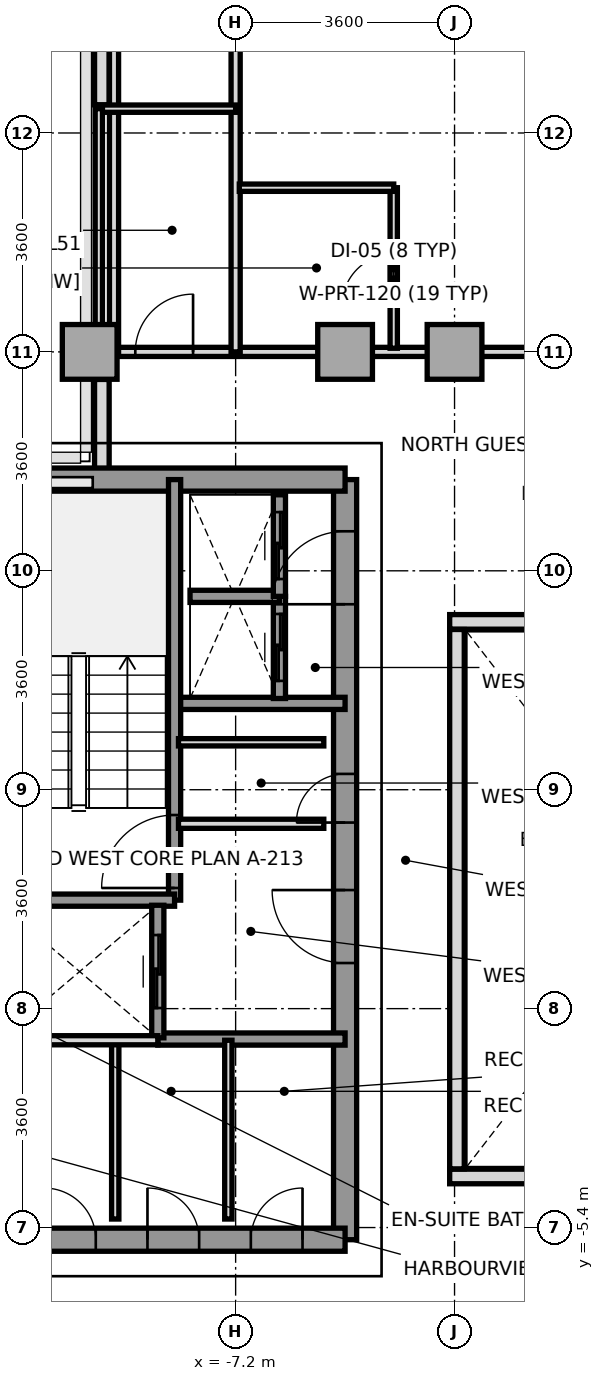
"""IFC4 building model, lengths in metres.
Left out: names, types, materials, properties, quantities, classifications, styles, units other than length and angle.
Written with IfcOpenShell. Run it as: python <this file> out.ifc"""

import sys

from ifc_helpers import new_model, si_unit, direction, frame, frame_2d, origin, origin_2d, place, context, subcontext, project, spatial, rectangle, extrude, source, transform, mapped, element, fill, save


model = new_model("IFC4")
c1 = context("Model", 3, precision=1e-05, world=origin(), true_north=direction((0.0, 1.0)))
c2 = subcontext(c1, "Body", "Model", "MODEL_VIEW")
j1 = project(units=[si_unit("LENGTHUNIT", "METRE"), si_unit("PLANEANGLEUNIT", "RADIAN")], contexts=[c1])
p1 = place(None, origin())
s1 = spatial("IfcSite", under=j1, at=p1, CompositionType="ELEMENT")
p2 = place(p1, origin())
s2 = spatial("IfcBuilding", under=s1, at=p2, CompositionType="ELEMENT")
p3 = place(p2, frame((0.0, 0.0, 187.6)))
s3 = spatial("IfcBuildingStorey", under=s2, at=p3, CompositionType="ELEMENT", Elevation=187.6)
m1 = source(origin(), c2, "Body", "SweptSolid", [
    extrude(rectangle(XDim=0.9, YDim=0.9, at=origin_2d()), origin(), (0.0, 0.0, 1.0), 3.2),
])
for number, where, z_axis, x_axis in (
    (1, (-9.6, 9.0, 0.0), (0.0, 0.0, 1.0), (1.0, 0.0, 0.0)),
    (2, (-5.4, 9.0, 0.0), (0.0, 0.0, 1.0), (1.0, 0.0, 0.0)),
    (3, (-3.6, 9.0, 0.0), (0.0, 0.0, 1.0), (1.0, 0.0, 0.0)),
):
    element("IfcColumn", number, at=place(p3, frame(where, z_axis=z_axis, x_axis=x_axis)), inside=s3, PredefinedType="COLUMN", context=c2, shape_type="MappedRepresentation", body=[
        mapped(m1, transform((0.0, 0.0, 0.0), x_axis=(1.0, 0.0, 0.0), y_axis=(0.0, 1.0, 0.0), z_axis=(0.0, 0.0, 1.0), scale=1.0)),
    ])
p4 = place(p3, frame((-9.4, 6.953, 0.0), z_axis=(0.0, 0.0, 1.0), x_axis=(0.0, 1.0, 0.0)))
e4 = element("IfcWall", 4, at=p4, inside=s3, PredefinedType="PARAPET", context=c2, shape_type="SweptSolid", body=[
    extrude(rectangle(XDim=1.594, YDim=0.24, at=frame_2d((0.797, 0.0))), origin(), (0.0, 0.0, 1.0), 1.15),
])
p5 = place(p3, frame((-9.4, 13.063, 0.0), z_axis=(0.0, 0.0, 1.0), x_axis=(0.0, 1.0, 0.0)))
e5 = element("IfcWall", 5, at=p5, inside=s3, PredefinedType="PARAPET", context=c2, shape_type="SweptSolid", body=[
    extrude(rectangle(XDim=2.54, YDim=0.24, at=frame_2d((1.27, 0.0))), origin(), (0.0, 0.0, 1.0), 1.15),
])
p6 = place(p3, frame((-5.4, -5.6, 0.0), z_axis=(0.0, 0.0, 1.0), x_axis=(0.0, 1.0, 0.0)))
e6 = element("IfcWall", 6, at=p6, inside=s3, PredefinedType="SHEAR", context=c2, shape_type="SweptSolid", body=[
    extrude(rectangle(XDim=12.5, YDim=0.38, at=frame_2d((6.25, 0.0))), origin(), (0.0, 0.0, 1.0), 3.2),
])
p7 = place(p6, frame((4.55, 0.0, 0.0)))
e7 = element("IfcOpeningElement", 7, at=p7, cuts=e6, PredefinedType="OPENING", context=c2, shape_type="SweptSolid", body=[
    extrude(rectangle(XDim=1.2, YDim=2.2, at=frame_2d((0.6, 1.1))), frame((0.0, 0.2, 0.0), z_axis=(0.0, -1.0, 0.0), x_axis=(1.0, 0.0, 0.0)), (0.0, 0.0, 1.0), 0.4),
])
p8 = place(p6, frame((10.45, 0.0, 0.0)))
e8 = element("IfcOpeningElement", 8, at=p8, cuts=e6, PredefinedType="OPENING", context=c2, shape_type="SweptSolid", body=[
    extrude(rectangle(XDim=1.2, YDim=2.2, at=frame_2d((0.6, 1.1))), frame((0.0, 0.2, 0.0), z_axis=(0.0, -1.0, 0.0), x_axis=(1.0, 0.0, 0.0)), (0.0, 0.0, 1.0), 0.4),
])
p9 = place(p6, frame((6.86, 0.0, 0.0)))
e9 = element("IfcOpeningElement", 9, at=p9, cuts=e6, PredefinedType="OPENING", context=c2, shape_type="SweptSolid", body=[
    extrude(rectangle(XDim=0.8, YDim=2.1, at=frame_2d((0.4, 1.05))), frame((0.0, 0.2, 0.0), z_axis=(0.0, -1.0, 0.0), x_axis=(1.0, 0.0, 0.0)), (0.0, 0.0, 1.0), 0.4),
])
p10 = place(p3, frame((-11.356, 6.9, 0.0), z_axis=(0.0, 0.0, 1.0), x_axis=(1.0, 0.0, 0.0)))
e10 = element("IfcWall", 10, at=p10, inside=s3, PredefinedType="SHEAR", context=c2, shape_type="SweptSolid", body=[
    extrude(rectangle(XDim=5.956, YDim=0.38, at=frame_2d((2.978, 0.0))), origin(), (0.0, 0.0, 1.0), 3.2),
])
p11 = place(p3, frame((-13.2, -5.6, 0.0), z_axis=(0.0, 0.0, 1.0), x_axis=(1.0, 0.0, 0.0)))
e11 = element("IfcWall", 11, at=p11, inside=s3, PredefinedType="SHEAR", context=c2, shape_type="SweptSolid", body=[
    extrude(rectangle(XDim=7.8, YDim=0.38, at=frame_2d((3.9, 0.0))), origin(), (0.0, 0.0, 1.0), 3.2),
])
p12 = place(p11, frame((0.28, 0.0, 0.0)))
e12 = element("IfcOpeningElement", 12, at=p12, cuts=e11, PredefinedType="OPENING", context=c2, shape_type="SweptSolid", body=[
    extrude(rectangle(XDim=0.85, YDim=2.1, at=frame_2d((0.425, 1.05))), frame((0.0, 0.2, 0.0), z_axis=(0.0, -1.0, 0.0), x_axis=(1.0, 0.0, 0.0)), (0.0, 0.0, 1.0), 0.4),
])
p13 = place(p11, frame((1.36, 0.0, 0.0)))
e13 = element("IfcOpeningElement", 13, at=p13, cuts=e11, PredefinedType="OPENING", context=c2, shape_type="SweptSolid", body=[
    extrude(rectangle(XDim=0.85, YDim=2.1, at=frame_2d((0.425, 1.05))), frame((0.0, 0.2, 0.0), z_axis=(0.0, -1.0, 0.0), x_axis=(1.0, 0.0, 0.0)), (0.0, 0.0, 1.0), 0.4),
])
p14 = place(p11, frame((2.85, 0.0, 0.0)))
e14 = element("IfcOpeningElement", 14, at=p14, cuts=e11, PredefinedType="OPENING", context=c2, shape_type="SweptSolid", body=[
    extrude(rectangle(XDim=0.85, YDim=2.1, at=frame_2d((0.425, 1.05))), frame((0.0, 0.2, 0.0), z_axis=(0.0, -1.0, 0.0), x_axis=(1.0, 0.0, 0.0)), (0.0, 0.0, 1.0), 0.4),
])
p15 = place(p11, frame((4.55, 0.0, 0.0)))
e15 = element("IfcOpeningElement", 15, at=p15, cuts=e11, PredefinedType="OPENING", context=c2, shape_type="SweptSolid", body=[
    extrude(rectangle(XDim=0.85, YDim=2.1, at=frame_2d((0.425, 1.05))), frame((0.0, 0.2, 0.0), z_axis=(0.0, -1.0, 0.0), x_axis=(1.0, 0.0, 0.0)), (0.0, 0.0, 1.0), 0.4),
])
p16 = place(p11, frame((6.25, 0.0, 0.0)))
e16 = element("IfcOpeningElement", 16, at=p16, cuts=e11, PredefinedType="OPENING", context=c2, shape_type="SweptSolid", body=[
    extrude(rectangle(XDim=0.85, YDim=2.1, at=frame_2d((0.425, 1.05))), frame((0.0, 0.2, 0.0), z_axis=(0.0, -1.0, 0.0), x_axis=(1.0, 0.0, 0.0)), (0.0, 0.0, 1.0), 0.4),
])
p17 = place(p3, frame((-8.18, 3.22, 0.0), z_axis=(0.0, 0.0, 1.0), x_axis=(1.0, 0.0, 0.0)))
e17 = element("IfcWall", 17, at=p17, inside=s3, PredefinedType="SOLIDWALL", context=c2, shape_type="SweptSolid", body=[
    extrude(rectangle(XDim=2.78, YDim=0.2, at=frame_2d((1.39, 0.0))), origin(), (0.0, 0.0, 1.0), 3.2),
])
p18 = place(p3, frame((-8.48, -2.3, 0.0), z_axis=(0.0, 0.0, 1.0), x_axis=(1.0, 0.0, 0.0)))
e18 = element("IfcWall", 18, at=p18, inside=s3, PredefinedType="SOLIDWALL", context=c2, shape_type="SweptSolid", body=[
    extrude(rectangle(XDim=3.08, YDim=0.2, at=frame_2d((1.54, 0.0))), origin(), (0.0, 0.0, 1.0), 3.2),
])
p19 = place(p3, frame((-8.204, -0.016, 0.0), z_axis=(0.0, 0.0, 1.0), x_axis=(0.0, 1.0, 0.0)))
e19 = element("IfcWall", 19, at=p19, inside=s3, PredefinedType="SOLIDWALL", context=c2, shape_type="SweptSolid", body=[
    extrude(rectangle(XDim=6.916, YDim=0.2, at=frame_2d((3.458, 0.0))), origin(), (0.0, 0.0, 1.0), 3.2),
])
p20 = place(p19, frame((0.2, 0.0, 0.0)))
e20 = element("IfcOpeningElement", 20, at=p20, cuts=e19, PredefinedType="OPENING", context=c2, shape_type="SweptSolid", body=[
    extrude(rectangle(XDim=1.2, YDim=2.2, at=frame_2d((0.6, 1.1))), frame((0.0, 0.11, 0.0), z_axis=(0.0, -1.0, 0.0), x_axis=(1.0, 0.0, 0.0)), (0.0, 0.0, 1.0), 0.22),
])
p21 = place(p3, frame((-11.356, -0.016, 0.0), z_axis=(0.0, 0.0, 1.0), x_axis=(1.0, 0.0, 0.0)))
e21 = element("IfcWall", 21, at=p21, inside=s3, PredefinedType="SOLIDWALL", context=c2, shape_type="SweptSolid", body=[
    extrude(rectangle(XDim=3.152, YDim=0.2, at=frame_2d((1.576, 0.0))), origin(), (0.0, 0.0, 1.0), 3.2),
])
p22 = place(p3, frame((-8.48, -2.28, 0.0), z_axis=(0.0, 0.0, 1.0), x_axis=(0.0, 1.0, 0.0)))
e22 = element("IfcWall", 22, at=p22, inside=s3, PredefinedType="SOLIDWALL", context=c2, shape_type="SweptSolid", body=[
    extrude(rectangle(XDim=2.18, YDim=0.2, at=frame_2d((1.09, 0.0))), origin(), (0.0, 0.0, 1.0), 3.2),
])
p23 = place(p22, frame((0.49, 0.0, 0.0)))
e23 = element("IfcOpeningElement", 23, at=p23, cuts=e22, PredefinedType="OPENING", context=c2, shape_type="SweptSolid", body=[
    extrude(rectangle(XDim=1.2, YDim=2.2, at=frame_2d((0.6, 1.1))), frame((0.0, 0.11, 0.0), z_axis=(0.0, -1.0, 0.0), x_axis=(1.0, 0.0, 0.0)), (0.0, 0.0, 1.0), 0.22),
])
p24 = place(p3, frame((-6.48, 3.3, 0.0), z_axis=(0.0, 0.0, 1.0), x_axis=(0.0, 1.0, 0.0)))
e24 = element("IfcWall", 24, at=p24, inside=s3, PredefinedType="SOLIDWALL", context=c2, shape_type="SweptSolid", body=[
    extrude(rectangle(XDim=1.68, YDim=0.2, at=frame_2d((0.84, 0.0))), origin(), (0.0, 0.0, 1.0), 3.2),
])
p25 = place(p24, frame((0.29, 0.0, 0.0)))
e25 = element("IfcOpeningElement", 25, at=p25, cuts=e24, PredefinedType="OPENING", context=c2, shape_type="SweptSolid", body=[
    extrude(rectangle(XDim=1.1, YDim=2.2, at=frame_2d((0.55, 1.1))), frame((0.0, 0.11, 0.0), z_axis=(0.0, -1.0, 0.0), x_axis=(1.0, 0.0, 0.0)), (0.0, 0.0, 1.0), 0.22),
])
p26 = place(p3, frame((-7.95, 4.98, 0.0), z_axis=(0.0, 0.0, 1.0), x_axis=(1.0, 0.0, 0.0)))
e26 = element("IfcWall", 26, at=p26, inside=s3, PredefinedType="SOLIDWALL", context=c2, shape_type="SweptSolid", body=[
    extrude(rectangle(XDim=1.47, YDim=0.2, at=frame_2d((0.735, 0.0))), origin(), (0.0, 0.0, 1.0), 3.2),
])
p27 = place(p3, frame((-6.48, 4.98, 0.0), z_axis=(0.0, 0.0, 1.0), x_axis=(0.0, 1.0, 0.0)))
e27 = element("IfcWall", 27, at=p27, inside=s3, PredefinedType="SOLIDWALL", context=c2, shape_type="SweptSolid", body=[
    extrude(rectangle(XDim=1.67, YDim=0.2, at=frame_2d((0.835, 0.0))), origin(), (0.0, 0.0, 1.0), 3.2),
])
p28 = place(p27, frame((0.285, 0.0, 0.0)))
e28 = element("IfcOpeningElement", 28, at=p28, cuts=e27, PredefinedType="OPENING", context=c2, shape_type="SweptSolid", body=[
    extrude(rectangle(XDim=1.1, YDim=2.2, at=frame_2d((0.55, 1.1))), frame((0.0, 0.11, 0.0), z_axis=(0.0, -1.0, 0.0), x_axis=(1.0, 0.0, 0.0)), (0.0, 0.0, 1.0), 0.22),
])
p29 = place(p3, frame((-8.14, 1.24, 0.0), z_axis=(0.0, 0.0, 1.0), x_axis=(1.0, 0.0, 0.0)))
e29 = element("IfcWall", 29, at=p29, inside=s3, PredefinedType="PARTITIONING", context=c2, shape_type="SweptSolid", body=[
    extrude(rectangle(XDim=2.39, YDim=0.15, at=frame_2d((1.195, 0.0))), origin(), (0.0, 0.0, 1.0), 2.3),
])
p30 = place(p3, frame((-8.14, 2.58, 0.0), z_axis=(0.0, 0.0, 1.0), x_axis=(1.0, 0.0, 0.0)))
e30 = element("IfcWall", 30, at=p30, inside=s3, PredefinedType="PARTITIONING", context=c2, shape_type="SweptSolid", body=[
    extrude(rectangle(XDim=2.39, YDim=0.12, at=frame_2d((1.195, 0.0))), origin(), (0.0, 0.0, 1.0), 2.3),
])
for number, where, z_axis, x_axis in (
    (31, (-9.18, -5.26, 0.0), (0.0, 0.0, 1.0), (0.0, 1.0, 0.0)),
    (32, (-7.32, -5.26, 0.0), (0.0, 0.0, 1.0), (0.0, 1.0, 0.0)),
):
    element("IfcWall", number, at=place(p3, frame(where, z_axis=z_axis, x_axis=x_axis)), inside=s3, PredefinedType="PARTITIONING", context=c2, shape_type="SweptSolid", body=[
        extrude(rectangle(XDim=2.94, YDim=0.12, at=frame_2d((1.47, 0.0))), origin(), (0.0, 0.0, 1.0), 3.2),
    ])
p31 = place(p3, frame((-11.04, -2.32, 0.0), z_axis=(0.0, 0.0, 1.0), x_axis=(1.0, 0.0, 0.0)))
e33 = element("IfcWall", 33, at=p31, inside=s3, PredefinedType="PARTITIONING", context=c2, shape_type="SweptSolid", body=[
    extrude(rectangle(XDim=2.56, YDim=0.15, at=frame_2d((1.28, 0.0))), origin(), (0.0, 0.0, 1.0), 3.2),
])
p32 = place(p3, frame((-9.55, 9.0, 0.0), z_axis=(0.0, 0.0, 1.0), x_axis=(1.0, 0.0, 0.0)))
e34 = element("IfcWall", 34, at=p32, inside=s3, PredefinedType="PARTITIONING", context=c2, shape_type="SweptSolid", body=[
    extrude(rectangle(XDim=19.1, YDim=0.15, at=frame_2d((9.55, 0.0))), origin(), (0.0, 0.0, 1.0), 2.75),
])
p33 = place(p32, frame((0.7, 0.0, 0.0)))
e35 = element("IfcOpeningElement", 35, at=p33, cuts=e34, PredefinedType="OPENING", context=c2, shape_type="SweptSolid", body=[
    extrude(rectangle(XDim=0.95, YDim=2.15, at=frame_2d((0.475, 1.075))), frame((0.0, 0.085, 0.0), z_axis=(0.0, -1.0, 0.0), x_axis=(1.0, 0.0, 0.0)), (0.0, 0.0, 1.0), 0.17),
])
p34 = place(p32, frame((7.15, 0.0, 0.0)))
e36 = element("IfcOpeningElement", 36, at=p34, cuts=e34, PredefinedType="OPENING", context=c2, shape_type="SweptSolid", body=[
    extrude(rectangle(XDim=0.95, YDim=2.15, at=frame_2d((0.475, 1.075))), frame((0.0, 0.085, 0.0), z_axis=(0.0, -1.0, 0.0), x_axis=(1.0, 0.0, 0.0)), (0.0, 0.0, 1.0), 0.17),
])
p35 = place(p32, frame((11.55, 0.0, 0.0)))
e37 = element("IfcOpeningElement", 37, at=p35, cuts=e34, PredefinedType="OPENING", context=c2, shape_type="SweptSolid", body=[
    extrude(rectangle(XDim=0.95, YDim=2.15, at=frame_2d((0.475, 1.075))), frame((0.0, 0.085, 0.0), z_axis=(0.0, -1.0, 0.0), x_axis=(1.0, 0.0, 0.0)), (0.0, 0.0, 1.0), 0.17),
])
p36 = place(p3, frame((-9.2, 9.0, 0.0), z_axis=(0.0, 0.0, 1.0), x_axis=(0.0, 1.0, 0.0)))
e38 = element("IfcWall", 38, at=p36, inside=s3, PredefinedType="PARTITIONING", context=c2, shape_type="SweptSolid", body=[
    extrude(rectangle(XDim=6.68, YDim=0.15, at=frame_2d((3.34, 0.0))), origin(), (0.0, 0.0, 1.0), 2.75),
])
p37 = place(p3, frame((-7.2, 9.0, 0.0), z_axis=(0.0, 0.0, 1.0), x_axis=(0.0, 1.0, 0.0)))
e39 = element("IfcWall", 39, at=p37, inside=s3, PredefinedType="PARTITIONING", context=c2, shape_type="SweptSolid", body=[
    extrude(rectangle(XDim=14.4, YDim=0.15, at=frame_2d((7.2, 0.0))), origin(), (0.0, 0.0, 1.0), 2.75),
])
p38 = place(p3, frame((-9.45, 13.0, 0.0), z_axis=(0.0, 0.0, 1.0), x_axis=(1.0, 0.0, 0.0)))
e40 = element("IfcWall", 40, at=p38, inside=s3, PredefinedType="PARTITIONING", context=c2, shape_type="SweptSolid", body=[
    extrude(rectangle(XDim=2.25, YDim=0.12, at=frame_2d((1.125, 0.0))), origin(), (0.0, 0.0, 1.0), 3.2),
])
p39 = place(p3, frame((-9.45, 9.0, 0.0), z_axis=(0.0, 0.0, 1.0), x_axis=(0.0, 1.0, 0.0)))
e41 = element("IfcWall", 41, at=p39, inside=s3, PredefinedType="PARTITIONING", context=c2, shape_type="SweptSolid", body=[
    extrude(rectangle(XDim=4.0, YDim=0.12, at=frame_2d((2.0, 0.0))), origin(), (0.0, 0.0, 1.0), 3.2),
])
p40 = place(p3, frame((-4.6, 9.06, 0.0), z_axis=(0.0, 0.0, 1.0), x_axis=(0.0, 1.0, 0.0)))
e42 = element("IfcWall", 42, at=p40, inside=s3, PredefinedType="PARTITIONING", context=c2, shape_type="SweptSolid", body=[
    extrude(rectangle(XDim=2.64, YDim=0.12, at=frame_2d((1.32, 0.0))), origin(), (0.0, 0.0, 1.0), 3.2),
])
p41 = place(p40, frame((0.7, 0.0, 0.0)))
e43 = element("IfcOpeningElement", 43, at=p41, cuts=e42, PredefinedType="OPENING", context=c2, shape_type="SweptSolid", body=[
    extrude(rectangle(XDim=0.85, YDim=2.1, at=frame_2d((0.425, 1.05))), frame((0.0, 0.07, 0.0), z_axis=(0.0, -1.0, 0.0), x_axis=(1.0, 0.0, 0.0)), (0.0, 0.0, 1.0), 0.14),
])
p42 = place(p3, frame((-7.14, 11.7, 0.0), z_axis=(0.0, 0.0, 1.0), x_axis=(1.0, 0.0, 0.0)))
e44 = element("IfcWall", 44, at=p42, inside=s3, PredefinedType="PARTITIONING", context=c2, shape_type="SweptSolid", body=[
    extrude(rectangle(XDim=2.54, YDim=0.12, at=frame_2d((1.27, 0.0))), origin(), (0.0, 0.0, 1.0), 3.2),
])
for number, where, z_axis, x_axis in (
    (45, (-3.68, -4.56, 0.0), (0.0, 0.0, 1.0), (1.0, 0.0, 0.0)),
    (46, (-3.68, 4.56, 0.0), (0.0, 0.0, 1.0), (1.0, 0.0, 0.0)),
):
    element("IfcWall", number, at=place(p3, frame(where, z_axis=z_axis, x_axis=x_axis)), inside=s3, PredefinedType="PARAPET", context=c2, shape_type="SweptSolid", body=[
        extrude(rectangle(XDim=7.36, YDim=0.24, at=frame_2d((3.68, 0.0))), origin(), (0.0, 0.0, 1.0), 1.15),
    ])
p43 = place(p3, frame((-3.56, -4.435, 0.0), z_axis=(0.0, 0.0, 1.0), x_axis=(0.0, 1.0, 0.0)))
e47 = element("IfcWall", 47, at=p43, inside=s3, PredefinedType="PARAPET", context=c2, shape_type="SweptSolid", body=[
    extrude(rectangle(XDim=8.87, YDim=0.24, at=frame_2d((4.435, 0.0))), origin(), (0.0, 0.0, 1.0), 1.15),
])
m2 = source(origin(), c2, "Body", "SweptSolid", [
    extrude(rectangle(XDim=1.2, YDim=2.2, at=frame_2d((0.6, 1.1))), frame((0.0, 0.025, 0.0), z_axis=(0.0, -1.0, 0.0), x_axis=(1.0, 0.0, 0.0)), (0.0, 0.0, 1.0), 0.05),
])
p44 = place(p20, origin())
e48 = element("IfcDoor", 48, at=p44, inside=s3, OperationType="SINGLE_SWING_LEFT", PredefinedType="DOOR", context=c2, shape_type="MappedRepresentation", body=[
    mapped(m2, transform((0.0, 0.0, 0.0), x_axis=(1.0, 0.0, 0.0), y_axis=(0.0, 1.0, 0.0), z_axis=(0.0, 0.0, 1.0), scale=1.0)),
])
fill(e20, e48)
p45 = place(p7, origin())
e49 = element("IfcDoor", 49, at=p45, inside=s3, OperationType="SINGLE_SWING_RIGHT", PredefinedType="DOOR", context=c2, shape_type="MappedRepresentation", body=[
    mapped(m2, transform((0.0, 0.0, 0.0), x_axis=(1.0, 0.0, 0.0), y_axis=(0.0, 1.0, 0.0), z_axis=(0.0, 0.0, 1.0), scale=1.0)),
])
fill(e7, e49)
p46 = place(p8, origin())
e50 = element("IfcDoor", 50, at=p46, inside=s3, OperationType="SINGLE_SWING_LEFT", PredefinedType="DOOR", context=c2, shape_type="MappedRepresentation", body=[
    mapped(m2, transform((0.0, 0.0, 0.0), x_axis=(1.0, 0.0, 0.0), y_axis=(0.0, 1.0, 0.0), z_axis=(0.0, 0.0, 1.0), scale=1.0)),
])
fill(e8, e50)
m3 = source(origin(), c2, "Body", "SweptSolid", [
    extrude(rectangle(XDim=0.8, YDim=2.1, at=frame_2d((0.4, 1.05))), frame((0.0, 0.025, 0.0), z_axis=(0.0, -1.0, 0.0), x_axis=(1.0, 0.0, 0.0)), (0.0, 0.0, 1.0), 0.05),
])
p47 = place(p9, origin())
e51 = element("IfcDoor", 51, at=p47, inside=s3, OperationType="SINGLE_SWING_LEFT", PredefinedType="DOOR", context=c2, shape_type="MappedRepresentation", body=[
    mapped(m3, transform((0.0, 0.0, 0.0), x_axis=(1.0, 0.0, 0.0), y_axis=(0.0, 1.0, 0.0), z_axis=(0.0, 0.0, 1.0), scale=1.0)),
])
fill(e9, e51)
m4 = source(origin(), c2, "Body", "SweptSolid", [
    extrude(rectangle(XDim=0.85, YDim=2.1, at=frame_2d((0.425, 1.05))), frame((0.0, 0.025, 0.0), z_axis=(0.0, -1.0, 0.0), x_axis=(1.0, 0.0, 0.0)), (0.0, 0.0, 1.0), 0.05),
])
p48 = place(p14, origin())
e52 = element("IfcDoor", 52, at=p48, inside=s3, OperationType="SINGLE_SWING_LEFT", PredefinedType="DOOR", context=c2, shape_type="MappedRepresentation", body=[
    mapped(m4, transform((0.0, 0.0, 0.0), x_axis=(1.0, 0.0, 0.0), y_axis=(0.0, 1.0, 0.0), z_axis=(0.0, 0.0, 1.0), scale=1.0)),
])
fill(e14, e52)
p49 = place(p15, origin())
e53 = element("IfcDoor", 53, at=p49, inside=s3, OperationType="SINGLE_SWING_LEFT", PredefinedType="DOOR", context=c2, shape_type="MappedRepresentation", body=[
    mapped(m4, transform((0.0, 0.0, 0.0), x_axis=(1.0, 0.0, 0.0), y_axis=(0.0, 1.0, 0.0), z_axis=(0.0, 0.0, 1.0), scale=1.0)),
])
fill(e15, e53)
p50 = place(p16, origin())
e54 = element("IfcDoor", 54, at=p50, inside=s3, OperationType="SINGLE_SWING_RIGHT", PredefinedType="DOOR", context=c2, shape_type="MappedRepresentation", body=[
    mapped(m4, transform((0.0, 0.0, 0.0), x_axis=(1.0, 0.0, 0.0), y_axis=(0.0, 1.0, 0.0), z_axis=(0.0, 0.0, 1.0), scale=1.0)),
])
fill(e16, e54)
p51 = place(p23, origin())
e55 = element("IfcDoor", 55, at=p51, inside=s3, OperationType="SLIDING_TO_RIGHT", PredefinedType="DOOR", context=c2, shape_type="MappedRepresentation", body=[
    mapped(m2, transform((0.0, 0.0, 0.0), x_axis=(1.0, 0.0, 0.0), y_axis=(0.0, 1.0, 0.0), z_axis=(0.0, 0.0, 1.0), scale=1.0)),
])
fill(e23, e55)
m5 = source(origin(), c2, "Body", "SweptSolid", [
    extrude(rectangle(XDim=1.1, YDim=2.2, at=frame_2d((0.55, 1.1))), frame((0.0, 0.025, 0.0), z_axis=(0.0, -1.0, 0.0), x_axis=(1.0, 0.0, 0.0)), (0.0, 0.0, 1.0), 0.05),
])
p52 = place(p25, origin())
e56 = element("IfcDoor", 56, at=p52, inside=s3, OperationType="SLIDING_TO_LEFT", PredefinedType="DOOR", context=c2, shape_type="MappedRepresentation", body=[
    mapped(m5, transform((0.0, 0.0, 0.0), x_axis=(1.0, 0.0, 0.0), y_axis=(0.0, 1.0, 0.0), z_axis=(0.0, 0.0, 1.0), scale=1.0)),
])
fill(e25, e56)
p53 = place(p28, origin())
e57 = element("IfcDoor", 57, at=p53, inside=s3, OperationType="SLIDING_TO_LEFT", PredefinedType="DOOR", context=c2, shape_type="MappedRepresentation", body=[
    mapped(m5, transform((0.0, 0.0, 0.0), x_axis=(1.0, 0.0, 0.0), y_axis=(0.0, 1.0, 0.0), z_axis=(0.0, 0.0, 1.0), scale=1.0)),
])
fill(e28, e57)
m6 = source(origin(), c2, "Body", "SweptSolid", [
    extrude(rectangle(XDim=0.95, YDim=2.15, at=frame_2d((0.475, 1.075))), frame((0.0, 0.025, 0.0), z_axis=(0.0, -1.0, 0.0), x_axis=(1.0, 0.0, 0.0)), (0.0, 0.0, 1.0), 0.05),
])
p54 = place(p33, origin())
e58 = element("IfcDoor", 58, at=p54, inside=s3, OperationType="SINGLE_SWING_RIGHT", PredefinedType="DOOR", context=c2, shape_type="MappedRepresentation", body=[
    mapped(m6, transform((0.0, 0.0, 0.0), x_axis=(1.0, 0.0, 0.0), y_axis=(0.0, 1.0, 0.0), z_axis=(0.0, 0.0, 1.0), scale=1.0)),
])
fill(e35, e58)
p55 = place(p41, origin())
e59 = element("IfcDoor", 59, at=p55, inside=s3, OperationType="SINGLE_SWING_LEFT", PredefinedType="DOOR", context=c2, shape_type="MappedRepresentation", body=[
    mapped(m4, transform((0.0, 0.0, 0.0), x_axis=(1.0, 0.0, 0.0), y_axis=(0.0, 1.0, 0.0), z_axis=(0.0, 0.0, 1.0), scale=1.0)),
])
fill(e43, e59)
save(model, sys.argv[1])
